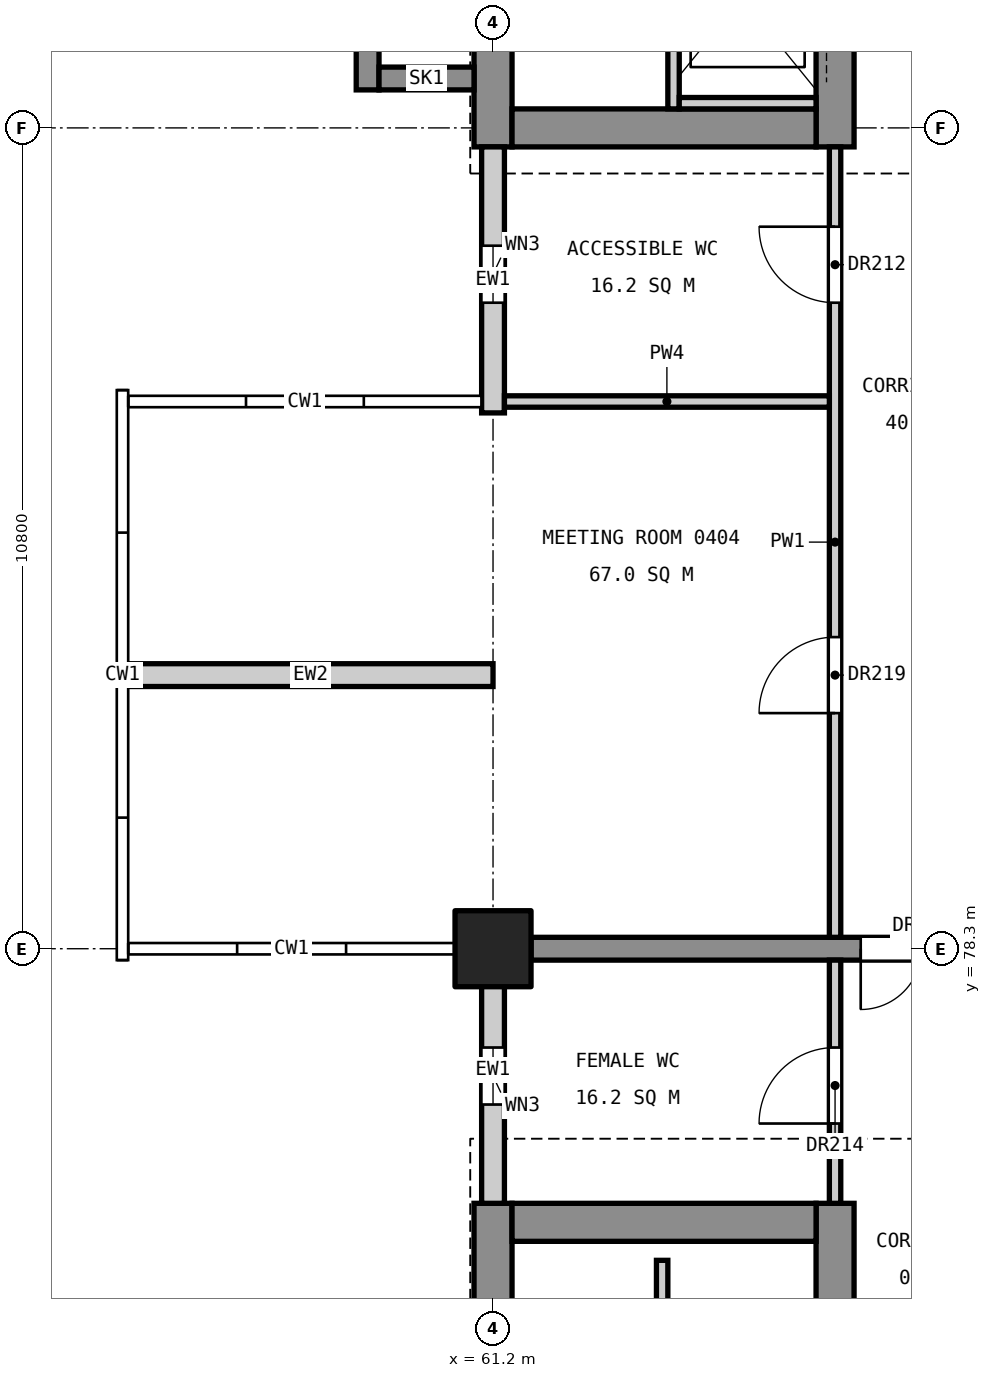
"""IFC4 building model, lengths in metres.
Left out: names, types, materials, properties, quantities, classifications, styles, units other than length and angle.
Written with IfcOpenShell. Run it as: python <this file> out.ifc"""

import sys

from ifc_helpers import new_model, si_unit, direction, frame, frame_2d, origin, origin_2d, place, context, subcontext, project, spatial, rectangle, extrude, element, fill, save


model = new_model("IFC4")
c1 = context("Model", 3, precision=1e-05, world=origin(), true_north=direction((0.0, 1.0)))
c2 = subcontext(c1, "Body", "Model", "MODEL_VIEW")
j1 = project(units=[si_unit("LENGTHUNIT", "METRE"), si_unit("PLANEANGLEUNIT", "RADIAN")], contexts=[c1])
p1 = place(None, origin())
s1 = spatial("IfcSite", under=j1, at=p1, CompositionType="ELEMENT")
p2 = place(p1, origin())
s2 = spatial("IfcBuilding", under=s1, at=p2, CompositionType="ELEMENT")
p3 = place(p2, frame((0.0, 0.0, 22.2)))
s3 = spatial("IfcBuildingStorey", under=s2, at=p3, CompositionType="ELEMENT", Elevation=22.2)
p4 = place(p3, frame((61.2, 78.3, 0.0), z_axis=(0.0, 0.0, 1.0), x_axis=(1.0, 0.0, 0.0)))
e1 = element("IfcColumn", 1, at=p4, inside=s3, PredefinedType="COLUMN", context=c2, shape_type="SweptSolid", body=[
    extrude(rectangle(XDim=1.0, YDim=1.0, at=origin_2d()), origin(), (0.0, 0.0, 1.0), 4.8),
])
p5 = place(p3, frame((61.2, 60.05, 0.0), z_axis=(0.0, 0.0, 1.0), x_axis=(0.0, 1.0, 0.0)))
e2 = element("IfcWall", 2, at=p5, inside=s3, PredefinedType="SHEAR", context=c2, shape_type="SweptSolid", body=[
    extrude(rectangle(XDim=14.9, YDim=0.5, at=frame_2d((7.45, 0.0))), origin(), (0.0, 0.0, 1.0), 4.55),
])
p6 = place(p5, frame((6.16, 0.0, 3.4)))
e3 = element("IfcOpeningElement", 3, at=p6, cuts=e2, PredefinedType="OPENING", context=c2, shape_type="SweptSolid", body=[
    extrude(rectangle(XDim=1.2, YDim=0.9, at=frame_2d((0.6, 0.45))), frame((0.0, 0.26, 0.0), z_axis=(0.0, -1.0, 0.0), x_axis=(1.0, 0.0, 0.0)), (0.0, 0.0, 1.0), 0.52),
])
p7 = place(p3, frame((65.7, 60.05, 0.0), z_axis=(0.0, 0.0, 1.0), x_axis=(0.0, 1.0, 0.0)))
e4 = element("IfcWall", 4, at=p7, inside=s3, PredefinedType="SHEAR", context=c2, shape_type="SweptSolid", body=[
    extrude(rectangle(XDim=14.9, YDim=0.5, at=frame_2d((7.45, 0.0))), origin(), (0.0, 0.0, 1.0), 4.55),
])
p8 = place(p7, frame((0.55, 0.0, 0.0)))
e5 = element("IfcOpeningElement", 5, at=p8, cuts=e4, PredefinedType="OPENING", context=c2, shape_type="SweptSolid", body=[
    extrude(rectangle(XDim=1.4, YDim=2.1, at=frame_2d((0.7, 1.05))), frame((0.0, 0.26, 0.0), z_axis=(0.0, -1.0, 0.0), x_axis=(1.0, 0.0, 0.0)), (0.0, 0.0, 1.0), 0.52),
])
p9 = place(p7, frame((8.85, 0.0, 0.0)))
e6 = element("IfcOpeningElement", 6, at=p9, cuts=e4, PredefinedType="OPENING", context=c2, shape_type="SweptSolid", body=[
    extrude(rectangle(XDim=1.1, YDim=2.1, at=frame_2d((0.55, 1.05))), frame((0.0, 0.26, 0.0), z_axis=(0.0, -1.0, 0.0), x_axis=(1.0, 0.0, 0.0)), (0.0, 0.0, 1.0), 0.52),
])
p10 = place(p7, frame((11.4, 0.0, 0.0)))
e7 = element("IfcOpeningElement", 7, at=p10, cuts=e4, PredefinedType="OPENING", context=c2, shape_type="SweptSolid", body=[
    extrude(rectangle(XDim=1.1, YDim=2.1, at=frame_2d((0.55, 1.05))), frame((0.0, 0.26, 0.0), z_axis=(0.0, -1.0, 0.0), x_axis=(1.0, 0.0, 0.0)), (0.0, 0.0, 1.0), 0.52),
])
p11 = place(p3, frame((61.45, 74.7, 0.0), z_axis=(0.0, 0.0, 1.0), x_axis=(1.0, 0.0, 0.0)))
e8 = element("IfcWall", 8, at=p11, inside=s3, PredefinedType="SHEAR", context=c2, shape_type="SweptSolid", body=[
    extrude(rectangle(XDim=4.0, YDim=0.5, at=frame_2d((2.0, 0.0))), origin(), (0.0, 0.0, 1.0), 4.55),
])
p12 = place(p3, frame((61.2, 88.85, 0.0), z_axis=(0.0, 0.0, 1.0), x_axis=(0.0, 1.0, 0.0)))
e9 = element("IfcWall", 9, at=p12, inside=s3, PredefinedType="SHEAR", context=c2, shape_type="SweptSolid", body=[
    extrude(rectangle(XDim=11.3, YDim=0.5, at=frame_2d((5.65, 0.0))), origin(), (0.0, 0.0, 1.0), 4.55),
])
p13 = place(p12, frame((3.94, 0.0, 3.4)))
e10 = element("IfcOpeningElement", 10, at=p13, cuts=e9, PredefinedType="OPENING", context=c2, shape_type="SweptSolid", body=[
    extrude(rectangle(XDim=1.2, YDim=0.9, at=frame_2d((0.6, 0.45))), frame((0.0, 0.26, 0.0), z_axis=(0.0, -1.0, 0.0), x_axis=(1.0, 0.0, 0.0)), (0.0, 0.0, 1.0), 0.52),
])
p14 = place(p3, frame((65.7, 88.85, 0.0), z_axis=(0.0, 0.0, 1.0), x_axis=(0.0, 1.0, 0.0)))
e11 = element("IfcWall", 11, at=p14, inside=s3, PredefinedType="SHEAR", context=c2, shape_type="SweptSolid", body=[
    extrude(rectangle(XDim=11.3, YDim=0.5, at=frame_2d((5.65, 0.0))), origin(), (0.0, 0.0, 1.0), 4.55),
])
p15 = place(p14, frame((9.35, 0.0, 0.0)))
e12 = element("IfcOpeningElement", 12, at=p15, cuts=e11, PredefinedType="OPENING", context=c2, shape_type="SweptSolid", body=[
    extrude(rectangle(XDim=1.4, YDim=2.1, at=frame_2d((0.7, 1.05))), frame((0.0, 0.26, 0.0), z_axis=(0.0, -1.0, 0.0), x_axis=(1.0, 0.0, 0.0)), (0.0, 0.0, 1.0), 0.52),
])
p16 = place(p14, frame((1.4, 0.0, 0.0)))
e13 = element("IfcOpeningElement", 13, at=p16, cuts=e11, PredefinedType="OPENING", context=c2, shape_type="SweptSolid", body=[
    extrude(rectangle(XDim=1.1, YDim=2.1, at=frame_2d((0.55, 1.05))), frame((0.0, 0.26, 0.0), z_axis=(0.0, -1.0, 0.0), x_axis=(1.0, 0.0, 0.0)), (0.0, 0.0, 1.0), 0.52),
])
p17 = place(p3, frame((61.45, 89.1, 0.0), z_axis=(0.0, 0.0, 1.0), x_axis=(1.0, 0.0, 0.0)))
e14 = element("IfcWall", 14, at=p17, inside=s3, PredefinedType="SHEAR", context=c2, shape_type="SweptSolid", body=[
    extrude(rectangle(XDim=4.0, YDim=0.5, at=frame_2d((2.0, 0.0))), origin(), (0.0, 0.0, 1.0), 4.55),
])
p18 = place(p3, frame((59.55, 89.6, 0.0), z_axis=(0.0, 0.0, 1.0), x_axis=(0.0, 1.0, 0.0)))
e15 = element("IfcWall", 15, at=p18, inside=s3, PredefinedType="SHEAR", context=c2, shape_type="SweptSolid", body=[
    extrude(rectangle(XDim=2.4, YDim=0.3, at=frame_2d((1.2, 0.0))), origin(), (0.0, 0.0, 1.0), 4.8),
])
p19 = place(p3, frame((60.95, 89.75, 0.0), z_axis=(0.0, 0.0, 1.0), x_axis=(-1.0, 0.0, 0.0)))
e16 = element("IfcWall", 16, at=p19, inside=s3, PredefinedType="SHEAR", context=c2, shape_type="SweptSolid", body=[
    extrude(rectangle(XDim=1.25, YDim=0.3, at=frame_2d((0.625, 0.0))), origin(), (0.0, 0.0, 1.0), 4.8),
])
p20 = place(p3, frame((61.7, 78.3, 0.0), z_axis=(0.0, 0.0, 1.0), x_axis=(1.0, 0.0, 0.0)))
e17 = element("IfcWall", 17, at=p20, inside=s3, PredefinedType="SHEAR", context=c2, shape_type="SweptSolid", body=[
    extrude(rectangle(XDim=6.2, YDim=0.3, at=frame_2d((3.1, 0.0))), origin(), (0.0, 0.0, 1.0), 4.55),
])
p21 = place(p20, frame((4.337, 0.0, 0.0)))
e18 = element("IfcOpeningElement", 18, at=p21, cuts=e17, PredefinedType="OPENING", context=c2, shape_type="SweptSolid", body=[
    extrude(rectangle(XDim=1.6, YDim=2.1, at=frame_2d((0.8, 1.05))), frame((0.0, 0.16, 0.0), z_axis=(0.0, -1.0, 0.0), x_axis=(1.0, 0.0, 0.0)), (0.0, 0.0, 1.0), 0.32),
])
p22 = place(p3, frame((63.575, 92.0, 0.0), z_axis=(0.0, 0.0, 1.0), x_axis=(0.0, -1.0, 0.0)))
e19 = element("IfcWall", 19, at=p22, inside=s3, PredefinedType="SOLIDWALL", context=c2, shape_type="SweptSolid", body=[
    extrude(rectangle(XDim=2.65, YDim=0.15, at=frame_2d((1.325, 0.0))), origin(), (0.0, 0.0, 1.0), 4.8),
])
p23 = place(p3, frame((63.65, 89.425, 0.0), z_axis=(0.0, 0.0, 1.0), x_axis=(1.0, 0.0, 0.0)))
e20 = element("IfcWall", 20, at=p23, inside=s3, PredefinedType="SOLIDWALL", context=c2, shape_type="SweptSolid", body=[
    extrude(rectangle(XDim=1.8, YDim=0.15, at=frame_2d((0.9, 0.0))), origin(), (0.0, 0.0, 1.0), 4.8),
])
p24 = place(p3, frame((63.425, 73.3, 0.0), z_axis=(0.0, 0.0, 1.0), x_axis=(0.0, 1.0, 0.0)))
e21 = element("IfcWall", 21, at=p24, inside=s3, PredefinedType="SOLIDWALL", context=c2, shape_type="SweptSolid", body=[
    extrude(rectangle(XDim=0.9, YDim=0.15, at=frame_2d((0.45, 0.0))), origin(), (0.0, 0.0, 1.0), 4.8),
])
p25 = place(p3, frame((61.2, 74.95, 0.0), z_axis=(0.0, 0.0, 1.0), x_axis=(0.0, 1.0, 0.0)))
e22 = element("IfcWall", 22, at=p25, inside=s3, PredefinedType="STANDARD", context=c2, shape_type="SweptSolid", body=[
    extrude(rectangle(XDim=3.5, YDim=0.3, at=frame_2d((1.75, 0.0))), origin(), (0.0, 0.0, 1.0), 3.65),
])
p26 = place(p25, frame((1.3, 0.0, 0.8)))
e23 = element("IfcOpeningElement", 23, at=p26, cuts=e22, PredefinedType="OPENING", context=c2, shape_type="SweptSolid", body=[
    extrude(rectangle(XDim=0.75, YDim=1.2, at=frame_2d((0.375, 0.6))), frame((0.0, 0.16, 0.0), z_axis=(0.0, -1.0, 0.0), x_axis=(1.0, 0.0, 0.0)), (0.0, 0.0, 1.0), 0.32),
])
p27 = place(p3, frame((61.2, 85.35, 0.0), z_axis=(0.0, 0.0, 1.0), x_axis=(0.0, 1.0, 0.0)))
e24 = element("IfcWall", 24, at=p27, inside=s3, PredefinedType="STANDARD", context=c2, shape_type="SweptSolid", body=[
    extrude(rectangle(XDim=3.5, YDim=0.3, at=frame_2d((1.75, 0.0))), origin(), (0.0, 0.0, 1.0), 3.65),
])
p28 = place(p27, frame((1.45, 0.0, 0.8)))
e25 = element("IfcOpeningElement", 25, at=p28, cuts=e24, PredefinedType="OPENING", context=c2, shape_type="SweptSolid", body=[
    extrude(rectangle(XDim=0.75, YDim=1.2, at=frame_2d((0.375, 0.6))), frame((0.0, 0.16, 0.0), z_axis=(0.0, -1.0, 0.0), x_axis=(1.0, 0.0, 0.0)), (0.0, 0.0, 1.0), 0.32),
])
p29 = place(p3, frame((56.4, 81.9, 0.0), z_axis=(0.0, 0.0, 1.0), x_axis=(1.0, 0.0, 0.0)))
e26 = element("IfcWall", 26, at=p29, inside=s3, PredefinedType="STANDARD", context=c2, shape_type="SweptSolid", body=[
    extrude(rectangle(XDim=4.8, YDim=0.3, at=frame_2d((2.4, 0.0))), origin(), (0.0, 0.0, 1.0), 3.65),
])
p30 = place(p3, frame((65.7, 74.95, 0.0), z_axis=(0.0, 0.0, 1.0), x_axis=(0.0, 1.0, 0.0)))
e27 = element("IfcWall", 27, at=p30, inside=s3, PredefinedType="PARTITIONING", context=c2, shape_type="SweptSolid", body=[
    extrude(rectangle(XDim=3.2, YDim=0.15, at=frame_2d((1.6, 0.0))), origin(), (0.0, 0.0, 1.0), 3.55),
])
p31 = place(p30, frame((1.05, 0.0, 0.0)))
e28 = element("IfcOpeningElement", 28, at=p31, cuts=e27, PredefinedType="OPENING", context=c2, shape_type="SweptSolid", body=[
    extrude(rectangle(XDim=1.0, YDim=2.1, at=frame_2d((0.5, 1.05))), frame((0.0, 0.085, 0.0), z_axis=(0.0, -1.0, 0.0), x_axis=(1.0, 0.0, 0.0)), (0.0, 0.0, 1.0), 0.17),
])
p32 = place(p3, frame((65.7, 78.45, 0.0), z_axis=(0.0, 0.0, 1.0), x_axis=(0.0, 1.0, 0.0)))
e29 = element("IfcWall", 29, at=p32, inside=s3, PredefinedType="PARTITIONING", context=c2, shape_type="SweptSolid", body=[
    extrude(rectangle(XDim=10.4, YDim=0.15, at=frame_2d((5.2, 0.0))), origin(), (0.0, 0.0, 1.0), 3.55),
])
p33 = place(p32, frame((8.35, 0.0, 0.0)))
e30 = element("IfcOpeningElement", 30, at=p33, cuts=e29, PredefinedType="OPENING", context=c2, shape_type="SweptSolid", body=[
    extrude(rectangle(XDim=1.0, YDim=2.1, at=frame_2d((0.5, 1.05))), frame((0.0, 0.085, 0.0), z_axis=(0.0, -1.0, 0.0), x_axis=(1.0, 0.0, 0.0)), (0.0, 0.0, 1.0), 0.17),
])
p34 = place(p32, frame((2.95, 0.0, 0.0)))
e31 = element("IfcOpeningElement", 31, at=p34, cuts=e29, PredefinedType="OPENING", context=c2, shape_type="SweptSolid", body=[
    extrude(rectangle(XDim=1.0, YDim=2.1, at=frame_2d((0.5, 1.05))), frame((0.0, 0.085, 0.0), z_axis=(0.0, -1.0, 0.0), x_axis=(1.0, 0.0, 0.0)), (0.0, 0.0, 1.0), 0.17),
])
p35 = place(p3, frame((61.35, 85.5, 0.0), z_axis=(0.0, 0.0, 1.0), x_axis=(1.0, 0.0, 0.0)))
e32 = element("IfcWall", 32, at=p35, inside=s3, PredefinedType="PARTITIONING", context=c2, shape_type="SweptSolid", body=[
    extrude(rectangle(XDim=4.275, YDim=0.15, at=frame_2d((2.137, 0.0))), origin(), (0.0, 0.0, 1.0), 3.85),
])
p36 = place(p26, origin())
e33 = element("IfcWindow", 33, at=p36, inside=s3, PartitioningType="SINGLE_PANEL", PredefinedType="WINDOW", context=c2, shape_type="SweptSolid", body=[
    extrude(rectangle(XDim=0.75, YDim=1.2, at=frame_2d((0.375, 0.6))), frame((0.0, 0.03, 0.0), z_axis=(0.0, -1.0, 0.0), x_axis=(1.0, 0.0, 0.0)), (0.0, 0.0, 1.0), 0.06),
])
fill(e23, e33)
p37 = place(p28, origin())
e34 = element("IfcWindow", 34, at=p37, inside=s3, PartitioningType="SINGLE_PANEL", PredefinedType="WINDOW", context=c2, shape_type="SweptSolid", body=[
    extrude(rectangle(XDim=0.75, YDim=1.2, at=frame_2d((0.375, 0.6))), frame((0.0, 0.03, 0.0), z_axis=(0.0, -1.0, 0.0), x_axis=(1.0, 0.0, 0.0)), (0.0, 0.0, 1.0), 0.06),
])
fill(e25, e34)
p38 = place(p33, origin())
e35 = element("IfcDoor", 35, at=p38, inside=s3, OperationType="SINGLE_SWING_RIGHT", PredefinedType="DOOR", context=c2, shape_type="SweptSolid", body=[
    extrude(rectangle(XDim=1.0, YDim=2.1, at=frame_2d((0.5, 1.05))), frame((0.0, 0.025, 0.0), z_axis=(0.0, -1.0, 0.0), x_axis=(1.0, 0.0, 0.0)), (0.0, 0.0, 1.0), 0.05),
])
fill(e30, e35)
p39 = place(p31, origin())
e36 = element("IfcDoor", 36, at=p39, inside=s3, OperationType="SINGLE_SWING_LEFT", PredefinedType="DOOR", context=c2, shape_type="SweptSolid", body=[
    extrude(rectangle(XDim=1.0, YDim=2.1, at=frame_2d((0.5, 1.05))), frame((0.0, 0.025, 0.0), z_axis=(0.0, -1.0, 0.0), x_axis=(1.0, 0.0, 0.0)), (0.0, 0.0, 1.0), 0.05),
])
fill(e28, e36)
p40 = place(p34, origin())
e37 = element("IfcDoor", 37, at=p40, inside=s3, OperationType="SINGLE_SWING_LEFT", PredefinedType="DOOR", context=c2, shape_type="SweptSolid", body=[
    extrude(rectangle(XDim=1.0, YDim=2.1, at=frame_2d((0.5, 1.05))), frame((0.0, 0.025, 0.0), z_axis=(0.0, -1.0, 0.0), x_axis=(1.0, 0.0, 0.0)), (0.0, 0.0, 1.0), 0.05),
])
fill(e31, e37)
p41 = place(p21, frame((1.6, 0.0, 0.0), z_axis=(0.0, 0.0, 1.0), x_axis=(-1.0, 0.0, 0.0)))
e38 = element("IfcDoor", 38, at=p41, inside=s3, OperationType="DOUBLE_DOOR_SINGLE_SWING", PredefinedType="DOOR", context=c2, shape_type="SweptSolid", body=[
    extrude(rectangle(XDim=1.6, YDim=2.1, at=frame_2d((0.8, 1.05))), frame((0.0, 0.025, 0.0), z_axis=(0.0, -1.0, 0.0), x_axis=(1.0, 0.0, 0.0)), (0.0, 0.0, 1.0), 0.05),
])
fill(e18, e38)
save(model, sys.argv[1])
